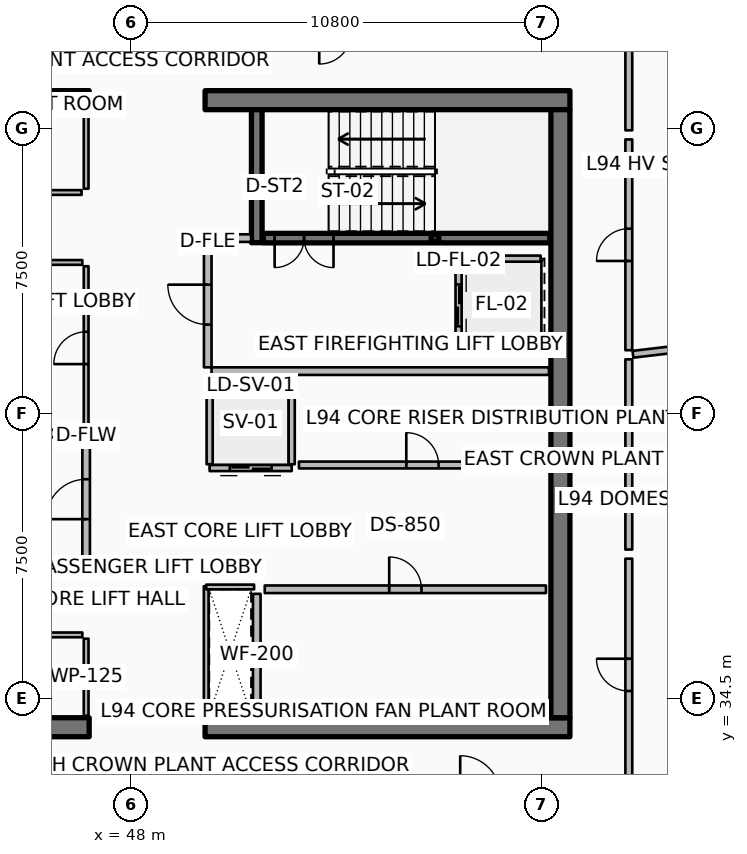
"""IFC4 building model, lengths in metres.
Left out: names, types, materials, properties, quantities, classifications, styles, units other than length and angle.
Written with IfcOpenShell. Run it as: python <this file> out.ifc"""

import sys

from ifc_helpers import new_model, si_unit, direction, frame, frame_2d, origin, origin_2d, place, context, subcontext, project, spatial, rectangle, hollow_rectangle, extrude, element, fill, save


model = new_model("IFC4")
c1 = context("Model", 3, precision=1e-05, world=origin(), true_north=direction((0.0, 1.0)))
c2 = subcontext(c1, "Body", "Model", "MODEL_VIEW")
j1 = project(units=[si_unit("LENGTHUNIT", "METRE"), si_unit("PLANEANGLEUNIT", "RADIAN")], contexts=[c1])
p1 = place(None, origin())
s1 = spatial("IfcSite", under=j1, at=p1, CompositionType="ELEMENT")
p2 = place(p1, origin())
s2 = spatial("IfcBuilding", under=s1, at=p2, CompositionType="ELEMENT")
p3 = place(p2, frame((0.0, 0.0, 374.0)))
s3 = spatial("IfcBuildingStorey", under=s2, at=p3, CompositionType="ELEMENT", Elevation=374.0)
p4 = place(p3, frame((37.3, 33.75, 0.0), z_axis=(0.0, 0.0, 1.0), x_axis=(1.0, 0.0, 0.0)))
e1 = element("IfcWall", 1, at=p4, inside=s3, PredefinedType="SHEAR", context=c2, shape_type="SweptSolid", body=[
    extrude(rectangle(XDim=9.6, YDim=0.5, at=frame_2d((4.8, 0.0))), origin(), (0.0, 0.0, 1.0), 3.6),
])
p5 = place(p3, frame((49.95, 33.75, 0.0), z_axis=(0.0, 0.0, 1.0), x_axis=(1.0, 0.0, 0.0)))
e2 = element("IfcWall", 2, at=p5, inside=s3, PredefinedType="SHEAR", context=c2, shape_type="SweptSolid", body=[
    extrude(rectangle(XDim=9.6, YDim=0.5, at=frame_2d((4.8, 0.0))), origin(), (0.0, 0.0, 1.0), 3.6),
])
p6 = place(p3, frame((37.3, 50.25, 0.0), z_axis=(0.0, 0.0, 1.0), x_axis=(1.0, 0.0, 0.0)))
e3 = element("IfcWall", 3, at=p6, inside=s3, PredefinedType="SHEAR", context=c2, shape_type="SweptSolid", body=[
    extrude(rectangle(XDim=9.6, YDim=0.5, at=frame_2d((4.8, 0.0))), origin(), (0.0, 0.0, 1.0), 3.6),
])
p7 = place(p3, frame((49.95, 50.25, 0.0), z_axis=(0.0, 0.0, 1.0), x_axis=(1.0, 0.0, 0.0)))
e4 = element("IfcWall", 4, at=p7, inside=s3, PredefinedType="SHEAR", context=c2, shape_type="SweptSolid", body=[
    extrude(rectangle(XDim=9.6, YDim=0.5, at=frame_2d((4.8, 0.0))), origin(), (0.0, 0.0, 1.0), 3.6),
])
p8 = place(p3, frame((59.3, 34.0, 0.0), z_axis=(0.0, 0.0, 1.0), x_axis=(0.0, 1.0, 0.0)))
e5 = element("IfcWall", 5, at=p8, inside=s3, PredefinedType="SHEAR", context=c2, shape_type="SweptSolid", body=[
    extrude(rectangle(XDim=16.0, YDim=0.5, at=frame_2d((8.0, 0.0))), origin(), (0.0, 0.0, 1.0), 3.6),
])
p9 = place(p3, frame((51.31, 46.5, 0.0), z_axis=(0.0, 0.0, 1.0), x_axis=(0.0, 1.0, 0.0)))
e6 = element("IfcWall", 6, at=p9, inside=s3, PredefinedType="SHEAR", context=c2, shape_type="SweptSolid", body=[
    extrude(rectangle(XDim=3.5, YDim=0.28, at=frame_2d((1.75, 0.0))), origin(), (0.0, 0.0, 1.0), 3.6),
])
p10 = place(p3, frame((56.0, 46.62, 0.0), z_axis=(0.0, 0.0, 1.0), x_axis=(1.0, 0.0, 0.0)))
e7 = element("IfcColumn", 7, at=p10, inside=s3, PredefinedType="COLUMN", context=c2, shape_type="SweptSolid", body=[
    extrude(hollow_rectangle(XDim=0.2, YDim=0.2, WallThickness=0.01, InnerFilletRadius=0.01, OuterFilletRadius=0.02, at=origin_2d()), origin(), (0.0, 0.0, 1.0), 1.595),
])
p11 = place(p3, frame((51.48, 46.62, 0.0), z_axis=(0.0, 0.0, 1.0), x_axis=(1.0, 0.0, 0.0)))
e8 = element("IfcWall", 8, at=p11, inside=s3, PredefinedType="SOLIDWALL", context=c2, shape_type="SweptSolid", body=[
    extrude(rectangle(XDim=7.54, YDim=0.25, at=frame_2d((3.77, 0.0))), origin(), (0.0, 0.0, 1.0), 3.36),
])
p12 = place(p11, frame((0.3, 0.0, 0.0)))
e9 = element("IfcOpeningElement", 9, at=p12, cuts=e8, PredefinedType="OPENING", context=c2, shape_type="SweptSolid", body=[
    extrude(rectangle(XDim=1.55, YDim=2.15, at=frame_2d((0.775, 1.075))), frame((0.0, 0.135, 0.0), z_axis=(0.0, -1.0, 0.0), x_axis=(1.0, 0.0, 0.0)), (0.0, 0.0, 1.0), 0.27),
])
p13 = place(p3, frame((51.52, 37.38, 0.0), z_axis=(0.0, 0.0, 1.0), x_axis=(1.0, 0.0, 0.0)))
e10 = element("IfcWall", 10, at=p13, inside=s3, PredefinedType="PARTITIONING", context=c2, shape_type="SweptSolid", body=[
    extrude(rectangle(XDim=7.4, YDim=0.2, at=frame_2d((3.7, 0.0))), origin(), (0.0, 0.0, 1.0), 3.36),
])
p14 = place(p13, frame((3.275, 0.0, 0.0)))
e11 = element("IfcOpeningElement", 11, at=p14, cuts=e10, PredefinedType="OPENING", context=c2, shape_type="SweptSolid", body=[
    extrude(rectangle(XDim=0.85, YDim=2.06, at=frame_2d((0.425, 1.03))), frame((0.0, 0.11, 0.0), z_axis=(0.0, -1.0, 0.0), x_axis=(1.0, 0.0, 0.0)), (0.0, 0.0, 1.0), 0.22),
])
p15 = place(p3, frame((51.31, 34.05, 0.0), z_axis=(0.0, 0.0, 1.0), x_axis=(0.0, 1.0, 0.0)))
e12 = element("IfcWall", 12, at=p15, inside=s3, PredefinedType="PARTITIONING", context=c2, shape_type="SweptSolid", body=[
    extrude(rectangle(XDim=3.21, YDim=0.2, at=frame_2d((1.605, 0.0))), origin(), (0.0, 0.0, 1.0), 3.36),
])
p16 = place(p3, frame((56.62, 46.08, 0.0), z_axis=(0.0, 0.0, 1.0), x_axis=(0.0, -1.0, 0.0)))
e13 = element("IfcWall", 13, at=p16, inside=s3, PredefinedType="PARTITIONING", context=c2, shape_type="SweptSolid", body=[
    extrude(rectangle(XDim=2.46, YDim=0.16, at=frame_2d((1.23, 0.0))), origin(), (0.0, 0.0, 1.0), 3.36),
])
p17 = place(p16, frame((0.68, 0.0, 0.0)))
e14 = element("IfcOpeningElement", 14, at=p17, cuts=e13, PredefinedType="OPENING", context=c2, shape_type="SweptSolid", body=[
    extrude(rectangle(XDim=1.1, YDim=2.1, at=frame_2d((0.55, 1.05))), frame((0.0, 0.09, 0.0), z_axis=(0.0, -1.0, 0.0), x_axis=(1.0, 0.0, 0.0)), (0.0, 0.0, 1.0), 0.18),
])
for number, where, z_axis, x_axis in (
    (15, (56.72, 46.08, 0.0), (0.0, 0.0, 1.0), (1.0, 0.0, 0.0)),
    (16, (56.72, 43.62, 0.0), (0.0, 0.0, 1.0), (1.0, 0.0, 0.0)),
):
    element("IfcWall", number, at=place(p3, frame(where, z_axis=z_axis, x_axis=x_axis)), inside=s3, PredefinedType="PARTITIONING", context=c2, shape_type="SweptSolid", body=[
        extrude(rectangle(XDim=2.06, YDim=0.16, at=frame_2d((1.03, 0.0))), origin(), (0.0, 0.0, 1.0), 3.36),
    ])
p18 = place(p3, frame((52.23, 40.57, 0.0), z_axis=(0.0, 0.0, 1.0), x_axis=(-1.0, 0.0, 0.0)))
e17 = element("IfcWall", 17, at=p18, inside=s3, PredefinedType="PARTITIONING", context=c2, shape_type="SweptSolid", body=[
    extrude(rectangle(XDim=2.16, YDim=0.16, at=frame_2d((1.08, 0.0))), origin(), (0.0, 0.0, 1.0), 3.36),
])
p19 = place(p18, frame((0.53, 0.0, 0.0)))
e18 = element("IfcOpeningElement", 18, at=p19, cuts=e17, PredefinedType="OPENING", context=c2, shape_type="SweptSolid", body=[
    extrude(rectangle(XDim=1.1, YDim=2.1, at=frame_2d((0.55, 1.05))), frame((0.0, 0.09, 0.0), z_axis=(0.0, -1.0, 0.0), x_axis=(1.0, 0.0, 0.0)), (0.0, 0.0, 1.0), 0.18),
])
for number, where, z_axis, x_axis in (
    (19, (52.23, 40.67, 0.0), (0.0, 0.0, 1.0), (0.0, 1.0, 0.0)),
    (20, (50.07, 40.67, 0.0), (0.0, 0.0, 1.0), (0.0, 1.0, 0.0)),
):
    element("IfcWall", number, at=place(p3, frame(where, z_axis=z_axis, x_axis=x_axis)), inside=s3, PredefinedType="PARTITIONING", context=c2, shape_type="SweptSolid", body=[
        extrude(rectangle(XDim=2.16, YDim=0.16, at=frame_2d((1.08, 0.0))), origin(), (0.0, 0.0, 1.0), 3.36),
    ])
p20 = place(p3, frame((50.17, 42.93, 0.0), z_axis=(0.0, 0.0, 1.0), x_axis=(1.0, 0.0, 0.0)))
e21 = element("IfcWall", 21, at=p20, inside=s3, PredefinedType="PARTITIONING", context=c2, shape_type="SweptSolid", body=[
    extrude(rectangle(XDim=1.96, YDim=0.16, at=frame_2d((0.98, 0.0))), origin(), (0.0, 0.0, 1.0), 3.36),
])
p21 = place(p3, frame((52.42, 40.65, 0.0), z_axis=(0.0, 0.0, 1.0), x_axis=(1.0, 0.0, 0.0)))
e22 = element("IfcWall", 22, at=p21, inside=s3, PredefinedType="PARTITIONING", context=c2, shape_type="SweptSolid", body=[
    extrude(rectangle(XDim=6.5, YDim=0.18, at=frame_2d((3.25, 0.0))), origin(), (0.0, 0.0, 1.0), 3.36),
])
p22 = place(p21, frame((2.825, 0.0, 0.0)))
e23 = element("IfcOpeningElement", 23, at=p22, cuts=e22, PredefinedType="OPENING", context=c2, shape_type="SweptSolid", body=[
    extrude(rectangle(XDim=0.85, YDim=2.06, at=frame_2d((0.425, 1.03))), frame((0.0, 0.1, 0.0), z_axis=(0.0, -1.0, 0.0), x_axis=(1.0, 0.0, 0.0)), (0.0, 0.0, 1.0), 0.2),
])
p23 = place(p3, frame((46.82, 34.05, 0.0), z_axis=(0.0, 0.0, 1.0), x_axis=(0.0, 1.0, 0.0)))
e24 = element("IfcWall", 24, at=p23, inside=s3, PredefinedType="PARTITIONING", context=c2, shape_type="SweptSolid", body=[
    extrude(rectangle(XDim=2.03, YDim=0.125, at=frame_2d((1.015, 0.0))), origin(), (0.0, 0.0, 1.0), 2.8),
])
p24 = place(p3, frame((37.92, 36.18, 0.0), z_axis=(0.0, 0.0, 1.0), x_axis=(1.0, 0.0, 0.0)))
e25 = element("IfcWall", 25, at=p24, inside=s3, PredefinedType="PARTITIONING", context=c2, shape_type="SweptSolid", body=[
    extrude(rectangle(XDim=8.8, YDim=0.125, at=frame_2d((4.4, 0.0))), origin(), (0.0, 0.0, 1.0), 2.8),
])
p25 = place(p24, frame((3.975, 0.0, 0.0)))
e26 = element("IfcOpeningElement", 26, at=p25, cuts=e25, PredefinedType="OPENING", context=c2, shape_type="SweptSolid", body=[
    extrude(rectangle(XDim=0.85, YDim=2.06, at=frame_2d((0.425, 1.03))), frame((0.0, 0.073, 0.0), z_axis=(0.0, -1.0, 0.0), x_axis=(1.0, 0.0, 0.0)), (0.0, 0.0, 1.0), 0.145),
])
p26 = place(p3, frame((46.82, 47.92, 0.0), z_axis=(0.0, 0.0, 1.0), x_axis=(0.0, 1.0, 0.0)))
e27 = element("IfcWall", 27, at=p26, inside=s3, PredefinedType="PARTITIONING", context=c2, shape_type="SweptSolid", body=[
    extrude(rectangle(XDim=2.03, YDim=0.125, at=frame_2d((1.015, 0.0))), origin(), (0.0, 0.0, 1.0), 2.8),
])
p27 = place(p3, frame((42.2, 47.82, 0.0), z_axis=(0.0, 0.0, 1.0), x_axis=(1.0, 0.0, 0.0)))
e28 = element("IfcWall", 28, at=p27, inside=s3, PredefinedType="PARTITIONING", context=c2, shape_type="SweptSolid", body=[
    extrude(rectangle(XDim=4.5, YDim=0.125, at=frame_2d((2.25, 0.0))), origin(), (0.0, 0.0, 1.0), 2.8),
])
p28 = place(p27, frame((1.825, 0.0, 0.0)))
e29 = element("IfcOpeningElement", 29, at=p28, cuts=e28, PredefinedType="OPENING", context=c2, shape_type="SweptSolid", body=[
    extrude(rectangle(XDim=0.85, YDim=2.06, at=frame_2d((0.425, 1.03))), frame((0.0, 0.073, 0.0), z_axis=(0.0, -1.0, 0.0), x_axis=(1.0, 0.0, 0.0)), (0.0, 0.0, 1.0), 0.145),
])
p29 = place(p3, frame((41.35, 38.02, 0.0), z_axis=(0.0, 0.0, 1.0), x_axis=(1.0, 0.0, 0.0)))
e30 = element("IfcWall", 30, at=p29, inside=s3, PredefinedType="PARTITIONING", context=c2, shape_type="SweptSolid", body=[
    extrude(rectangle(XDim=5.37, YDim=0.2, at=frame_2d((2.685, 0.0))), origin(), (0.0, 0.0, 1.0), 3.36),
])
p30 = place(p3, frame((43.92, 41.48, 0.0), z_axis=(0.0, 0.0, 1.0), x_axis=(1.0, 0.0, 0.0)))
e31 = element("IfcWall", 31, at=p30, inside=s3, PredefinedType="PARTITIONING", context=c2, shape_type="SweptSolid", body=[
    extrude(rectangle(XDim=2.8, YDim=0.2, at=frame_2d((1.4, 0.0))), origin(), (0.0, 0.0, 1.0), 3.36),
])
p31 = place(p3, frame((46.82, 38.12, 0.0), z_axis=(0.0, 0.0, 1.0), x_axis=(0.0, 1.0, 0.0)))
e32 = element("IfcWall", 32, at=p31, inside=s3, PredefinedType="PARTITIONING", context=c2, shape_type="SweptSolid", body=[
    extrude(rectangle(XDim=3.26, YDim=0.2, at=frame_2d((1.63, 0.0))), origin(), (0.0, 0.0, 1.0), 3.36),
])
p32 = place(p31, frame((1.105, 0.0, 0.0)))
e33 = element("IfcOpeningElement", 33, at=p32, cuts=e32, PredefinedType="OPENING", context=c2, shape_type="SweptSolid", body=[
    extrude(rectangle(XDim=1.05, YDim=2.1, at=frame_2d((0.525, 1.05))), frame((0.0, 0.11, 0.0), z_axis=(0.0, -1.0, 0.0), x_axis=(1.0, 0.0, 0.0)), (0.0, 0.0, 1.0), 0.22),
])
p33 = place(p3, frame((50.12, 43.12, 0.0), z_axis=(0.0, 0.0, 1.0), x_axis=(1.0, 0.0, 0.0)))
e34 = element("IfcWall", 34, at=p33, inside=s3, PredefinedType="PARTITIONING", context=c2, shape_type="SweptSolid", body=[
    extrude(rectangle(XDim=8.88, YDim=0.2, at=frame_2d((4.44, 0.0))), origin(), (0.0, 0.0, 1.0), 3.36),
])
p34 = place(p3, frame((50.14, 46.62, 0.0), z_axis=(0.0, 0.0, 1.0), x_axis=(1.0, 0.0, 0.0)))
e35 = element("IfcWall", 35, at=p34, inside=s3, PredefinedType="PARTITIONING", context=c2, shape_type="SweptSolid", body=[
    extrude(rectangle(XDim=1.02, YDim=0.2, at=frame_2d((0.51, 0.0))), origin(), (0.0, 0.0, 1.0), 3.36),
])
p35 = place(p3, frame((50.02, 43.22, 0.0), z_axis=(0.0, 0.0, 1.0), x_axis=(0.0, 1.0, 0.0)))
e36 = element("IfcWall", 36, at=p35, inside=s3, PredefinedType="PARTITIONING", context=c2, shape_type="SweptSolid", body=[
    extrude(rectangle(XDim=3.3, YDim=0.2, at=frame_2d((1.65, 0.0))), origin(), (0.0, 0.0, 1.0), 3.36),
])
p36 = place(p35, frame((1.125, 0.0, 0.0)))
e37 = element("IfcOpeningElement", 37, at=p36, cuts=e36, PredefinedType="OPENING", context=c2, shape_type="SweptSolid", body=[
    extrude(rectangle(XDim=1.05, YDim=2.1, at=frame_2d((0.525, 1.05))), frame((0.0, 0.11, 0.0), z_axis=(0.0, -1.0, 0.0), x_axis=(1.0, 0.0, 0.0)), (0.0, 0.0, 1.0), 0.22),
])
p37 = place(p3, frame((41.36, 45.98, 0.0), z_axis=(0.0, 0.0, 1.0), x_axis=(1.0, 0.0, 0.0)))
e38 = element("IfcWall", 38, at=p37, inside=s3, PredefinedType="PARTITIONING", context=c2, shape_type="SweptSolid", body=[
    extrude(rectangle(XDim=5.36, YDim=0.125, at=frame_2d((2.68, 0.0))), origin(), (0.0, 0.0, 1.0), 2.8),
])
p38 = place(p3, frame((49.98, 34.06, 0.0), z_axis=(0.0, 0.0, 1.0), x_axis=(0.0, 1.0, 0.0)))
e39 = element("IfcWall", 39, at=p38, inside=s3, PredefinedType="PARTITIONING", context=c2, shape_type="SweptSolid", body=[
    extrude(rectangle(XDim=3.4, YDim=0.125, at=frame_2d((1.7, 0.0))), origin(), (0.0, 0.0, 1.0), 2.8),
])
p39 = place(p3, frame((49.98, 37.44, 0.0), z_axis=(0.0, 0.0, 1.0), x_axis=(1.0, 0.0, 0.0)))
e40 = element("IfcWall", 40, at=p39, inside=s3, PredefinedType="PARTITIONING", context=c2, shape_type="SweptSolid", body=[
    extrude(rectangle(XDim=1.26, YDim=0.125, at=frame_2d((0.63, 0.0))), origin(), (0.0, 0.0, 1.0), 2.8),
])
p40 = place(p3, frame((46.82, 41.58, 0.0), z_axis=(0.0, 0.0, 1.0), x_axis=(0.0, 1.0, 0.0)))
e41 = element("IfcWall", 41, at=p40, inside=s3, PredefinedType="PARTITIONING", context=c2, shape_type="SweptSolid", body=[
    extrude(rectangle(XDim=4.3, YDim=0.125, at=frame_2d((2.15, 0.0))), origin(), (0.0, 0.0, 1.0), 2.8),
])
p41 = place(p40, frame((1.725, 0.0, 0.0)))
e42 = element("IfcOpeningElement", 42, at=p41, cuts=e41, PredefinedType="OPENING", context=c2, shape_type="SweptSolid", body=[
    extrude(rectangle(XDim=0.85, YDim=2.06, at=frame_2d((0.425, 1.03))), frame((0.0, 0.073, 0.0), z_axis=(0.0, -1.0, 0.0), x_axis=(1.0, 0.0, 0.0)), (0.0, 0.0, 1.0), 0.145),
])
p42 = place(p3, frame((61.1, 32.07, 0.0), z_axis=(0.0, 0.0, 1.0), x_axis=(0.0, 1.0, 0.0)))
e43 = element("IfcWall", 43, at=p42, inside=s3, PredefinedType="PARTITIONING", context=c2, shape_type="SweptSolid", body=[
    extrude(rectangle(XDim=6.115, YDim=0.18, at=frame_2d((3.058, 0.0))), origin(), (0.0, 0.0, 1.0), 2.8),
])
p43 = place(p42, frame((2.633, 0.0, 0.0)))
e44 = element("IfcOpeningElement", 44, at=p43, cuts=e43, PredefinedType="OPENING", context=c2, shape_type="SweptSolid", body=[
    extrude(rectangle(XDim=0.85, YDim=2.06, at=frame_2d((0.425, 1.03))), frame((0.0, 0.1, 0.0), z_axis=(0.0, -1.0, 0.0), x_axis=(1.0, 0.0, 0.0)), (0.0, 0.0, 1.0), 0.2),
])
p44 = place(p3, frame((61.1, 38.425, 0.0), z_axis=(0.0, 0.0, 1.0), x_axis=(0.0, 1.0, 0.0)))
e45 = element("IfcWall", 45, at=p44, inside=s3, PredefinedType="PARTITIONING", context=c2, shape_type="SweptSolid", body=[
    extrude(rectangle(XDim=5.005, YDim=0.18, at=frame_2d((2.502, 0.0))), origin(), (0.0, 0.0, 1.0), 2.8),
])
p45 = place(p3, frame((61.209, 43.563, 0.0), z_axis=(0.0, 0.0, 1.0), x_axis=(0.993070558818, 0.117519637545, 0.0)))
e46 = element("IfcWall", 46, at=p45, inside=s3, PredefinedType="PARTITIONING", context=c2, shape_type="SweptSolid", body=[
    extrude(rectangle(XDim=7.83, YDim=0.18, at=frame_2d((3.915, 0.0))), origin(), (0.0, 0.0, 1.0), 2.8),
])
p46 = place(p3, frame((61.1, 43.67, 0.0), z_axis=(0.0, 0.0, 1.0), x_axis=(0.0, 1.0, 0.0)))
e47 = element("IfcWall", 47, at=p46, inside=s3, PredefinedType="PARTITIONING", context=c2, shape_type="SweptSolid", body=[
    extrude(rectangle(XDim=5.546, YDim=0.18, at=frame_2d((2.773, 0.0))), origin(), (0.0, 0.0, 1.0), 2.8),
])
p47 = place(p46, frame((2.348, 0.0, 0.0)))
e48 = element("IfcOpeningElement", 48, at=p47, cuts=e47, PredefinedType="OPENING", context=c2, shape_type="SweptSolid", body=[
    extrude(rectangle(XDim=0.85, YDim=2.06, at=frame_2d((0.425, 1.03))), frame((0.0, 0.1, 0.0), z_axis=(0.0, -1.0, 0.0), x_axis=(1.0, 0.0, 0.0)), (0.0, 0.0, 1.0), 0.2),
])
p48 = place(p3, frame((61.1, 49.456, 0.0), z_axis=(0.0, 0.0, 1.0), x_axis=(0.0, 1.0, 0.0)))
e49 = element("IfcWall", 49, at=p48, inside=s3, PredefinedType="PARTITIONING", context=c2, shape_type="SweptSolid", body=[
    extrude(rectangle(XDim=2.474, YDim=0.18, at=frame_2d((1.237, 0.0))), origin(), (0.0, 0.0, 1.0), 2.8),
])
p49 = place(p12, origin())
e50 = element("IfcDoor", 50, at=p49, inside=s3, OperationType="DOUBLE_DOOR_SINGLE_SWING", PredefinedType="DOOR", context=c2, shape_type="SweptSolid", body=[
    extrude(rectangle(XDim=1.55, YDim=2.15, at=frame_2d((0.775, 1.075))), frame((0.0, 0.025, 0.0), z_axis=(0.0, -1.0, 0.0), x_axis=(1.0, 0.0, 0.0)), (0.0, 0.0, 1.0), 0.05),
])
fill(e9, e50)
p50 = place(p14, origin())
e51 = element("IfcDoor", 51, at=p50, inside=s3, OperationType="SINGLE_SWING_LEFT", PredefinedType="DOOR", context=c2, shape_type="SweptSolid", body=[
    extrude(rectangle(XDim=0.85, YDim=2.06, at=frame_2d((0.425, 1.03))), frame((0.0, 0.025, 0.0), z_axis=(0.0, -1.0, 0.0), x_axis=(1.0, 0.0, 0.0)), (0.0, 0.0, 1.0), 0.05),
])
fill(e11, e51)
p51 = place(p17, origin())
e52 = element("IfcDoor", 52, at=p51, inside=s3, OperationType="DOUBLE_DOOR_SLIDING", PredefinedType="DOOR", context=c2, shape_type="SweptSolid", body=[
    extrude(rectangle(XDim=1.1, YDim=2.1, at=frame_2d((0.55, 1.05))), frame((0.0, 0.025, 0.0), z_axis=(0.0, -1.0, 0.0), x_axis=(1.0, 0.0, 0.0)), (0.0, 0.0, 1.0), 0.05),
])
fill(e14, e52)
p52 = place(p19, origin())
e53 = element("IfcDoor", 53, at=p52, inside=s3, OperationType="DOUBLE_DOOR_SLIDING", PredefinedType="DOOR", context=c2, shape_type="SweptSolid", body=[
    extrude(rectangle(XDim=1.1, YDim=2.1, at=frame_2d((0.55, 1.05))), frame((0.0, 0.025, 0.0), z_axis=(0.0, -1.0, 0.0), x_axis=(1.0, 0.0, 0.0)), (0.0, 0.0, 1.0), 0.05),
])
fill(e18, e53)
p53 = place(p22, origin())
e54 = element("IfcDoor", 54, at=p53, inside=s3, OperationType="SINGLE_SWING_LEFT", PredefinedType="DOOR", context=c2, shape_type="SweptSolid", body=[
    extrude(rectangle(XDim=0.85, YDim=2.06, at=frame_2d((0.425, 1.03))), frame((0.0, 0.025, 0.0), z_axis=(0.0, -1.0, 0.0), x_axis=(1.0, 0.0, 0.0)), (0.0, 0.0, 1.0), 0.05),
])
fill(e23, e54)
p54 = place(p32, origin())
e55 = element("IfcDoor", 55, at=p54, inside=s3, OperationType="SINGLE_SWING_LEFT", PredefinedType="DOOR", context=c2, shape_type="SweptSolid", body=[
    extrude(rectangle(XDim=1.05, YDim=2.1, at=frame_2d((0.525, 1.05))), frame((0.0, 0.025, 0.0), z_axis=(0.0, -1.0, 0.0), x_axis=(1.0, 0.0, 0.0)), (0.0, 0.0, 1.0), 0.05),
])
fill(e33, e55)
p55 = place(p36, origin())
e56 = element("IfcDoor", 56, at=p55, inside=s3, OperationType="SINGLE_SWING_RIGHT", PredefinedType="DOOR", context=c2, shape_type="SweptSolid", body=[
    extrude(rectangle(XDim=1.05, YDim=2.1, at=frame_2d((0.525, 1.05))), frame((0.0, 0.025, 0.0), z_axis=(0.0, -1.0, 0.0), x_axis=(1.0, 0.0, 0.0)), (0.0, 0.0, 1.0), 0.05),
])
fill(e37, e56)
p56 = place(p41, origin())
e57 = element("IfcDoor", 57, at=p56, inside=s3, OperationType="SINGLE_SWING_LEFT", PredefinedType="DOOR", context=c2, shape_type="SweptSolid", body=[
    extrude(rectangle(XDim=0.85, YDim=2.06, at=frame_2d((0.425, 1.03))), frame((0.0, 0.025, 0.0), z_axis=(0.0, -1.0, 0.0), x_axis=(1.0, 0.0, 0.0)), (0.0, 0.0, 1.0), 0.05),
])
fill(e42, e57)
p57 = place(p43, origin())
e58 = element("IfcDoor", 58, at=p57, inside=s3, OperationType="SINGLE_SWING_RIGHT", PredefinedType="DOOR", context=c2, shape_type="SweptSolid", body=[
    extrude(rectangle(XDim=0.85, YDim=2.06, at=frame_2d((0.425, 1.03))), frame((0.0, 0.025, 0.0), z_axis=(0.0, -1.0, 0.0), x_axis=(1.0, 0.0, 0.0)), (0.0, 0.0, 1.0), 0.05),
])
fill(e44, e58)
p58 = place(p47, origin())
e59 = element("IfcDoor", 59, at=p58, inside=s3, OperationType="SINGLE_SWING_LEFT", PredefinedType="DOOR", context=c2, shape_type="SweptSolid", body=[
    extrude(rectangle(XDim=0.85, YDim=2.06, at=frame_2d((0.425, 1.03))), frame((0.0, 0.025, 0.0), z_axis=(0.0, -1.0, 0.0), x_axis=(1.0, 0.0, 0.0)), (0.0, 0.0, 1.0), 0.05),
])
fill(e48, e59)
save(model, sys.argv[1])
